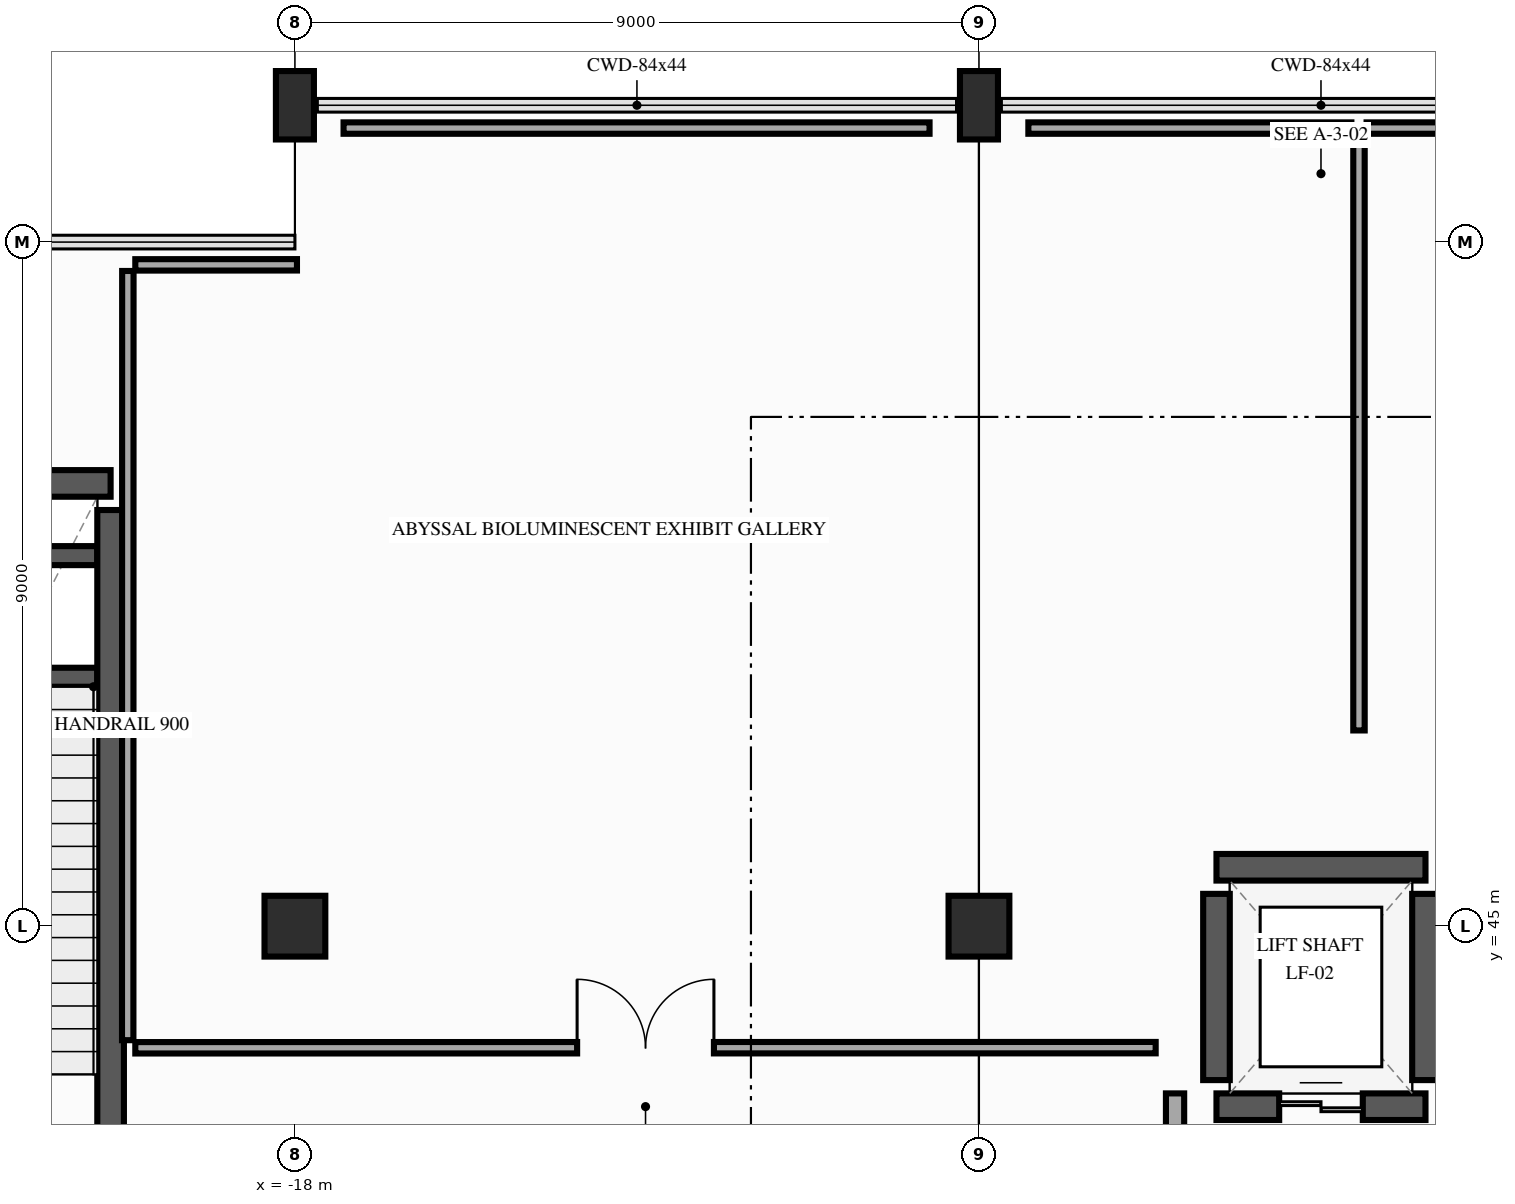
"""IFC4 building model, lengths in metres.
Left out: names, types, materials, properties, quantities, classifications, styles, units other than length and angle.
Written with IfcOpenShell. Run it as: python <this file> out.ifc"""

import sys

from ifc_helpers import new_model, si_unit, direction, frame, frame_2d, origin, origin_2d, place, context, subcontext, project, spatial, rectangle, extrude, element, fill, save


model = new_model("IFC4")
c1 = context("Model", 3, precision=1e-05, world=origin(), true_north=direction((0.0, 1.0)))
c2 = subcontext(c1, "Body", "Model", "MODEL_VIEW")
j1 = project(units=[si_unit("LENGTHUNIT", "METRE"), si_unit("PLANEANGLEUNIT", "RADIAN")], contexts=[c1])
p1 = place(None, origin())
s1 = spatial("IfcSite", under=j1, at=p1, CompositionType="ELEMENT")
p2 = place(p1, origin())
s2 = spatial("IfcBuilding", under=s1, at=p2, CompositionType="ELEMENT")
p3 = place(p2, frame((0.0, 0.0, 16.2)))
s3 = spatial("IfcBuildingStorey", under=s2, at=p3, CompositionType="ELEMENT", Elevation=16.2)
p4 = place(p3, frame((-18.0, 45.0, 0.0), z_axis=(0.0, 0.0, 1.0), x_axis=(1.0, 0.0, 0.0)))
e1 = element("IfcColumn", 1, at=p4, inside=s3, PredefinedType="COLUMN", context=c2, shape_type="SweptSolid", body=[
    extrude(rectangle(XDim=0.8, YDim=0.8, at=origin_2d()), origin(), (0.0, 0.0, 1.0), 5.4),
])
p5 = place(p3, frame((-18.0, 55.8, 0.0), z_axis=(0.0, 0.0, 1.0), x_axis=(1.0, 0.0, 0.0)))
e2 = element("IfcColumn", 2, at=p5, inside=s3, PredefinedType="PILASTER", context=c2, shape_type="SweptSolid", body=[
    extrude(rectangle(XDim=0.5, YDim=0.9, at=origin_2d()), origin(), (0.0, 0.0, 1.0), 5.4),
])
p6 = place(p3, frame((-9.0, 45.0, 0.0), z_axis=(0.0, 0.0, 1.0), x_axis=(1.0, 0.0, 0.0)))
e3 = element("IfcColumn", 3, at=p6, inside=s3, PredefinedType="COLUMN", context=c2, shape_type="SweptSolid", body=[
    extrude(rectangle(XDim=0.8, YDim=0.8, at=origin_2d()), origin(), (0.0, 0.0, 1.0), 5.4),
])
p7 = place(p3, frame((-9.0, 55.8, 0.0), z_axis=(0.0, 0.0, 1.0), x_axis=(1.0, 0.0, 0.0)))
e4 = element("IfcColumn", 4, at=p7, inside=s3, PredefinedType="PILASTER", context=c2, shape_type="SweptSolid", body=[
    extrude(rectangle(XDim=0.5, YDim=0.9, at=origin_2d()), origin(), (0.0, 0.0, 1.0), 5.4),
])
for number, where, z_axis, x_axis in (
    (5, (-24.4, 48.275, 0.0), (0.0, 0.0, 1.0), (1.0, 0.0, 0.0)),
    (6, (-24.4, 49.875, 0.0), (0.0, 0.0, 1.0), (1.0, 0.0, 0.0)),
):
    element("IfcWall", number, at=place(p3, frame(where, z_axis=z_axis, x_axis=x_axis)), inside=s3, PredefinedType="SHEAR", context=c2, shape_type="SweptSolid", body=[
        extrude(rectangle(XDim=3.8, YDim=0.25, at=frame_2d((1.9, 0.0))), origin(), (0.0, 0.0, 1.0), 2.5),
    ])
p8 = place(p3, frame((-24.575, 50.825, 0.0), z_axis=(0.0, 0.0, 1.0), x_axis=(1.0, 0.0, 0.0)))
e7 = element("IfcWall", 7, at=p8, inside=s3, PredefinedType="SHEAR", context=c2, shape_type="SweptSolid", body=[
    extrude(rectangle(XDim=4.15, YDim=0.35, at=frame_2d((2.075, 0.0))), origin(), (0.0, 0.0, 1.0), 5.15),
])
p9 = place(p3, frame((-20.425, 41.375, 0.0), z_axis=(0.0, 0.0, 1.0), x_axis=(0.0, 1.0, 0.0)))
e8 = element("IfcWall", 8, at=p9, inside=s3, PredefinedType="SHEAR", context=c2, shape_type="SweptSolid", body=[
    extrude(rectangle(XDim=9.1, YDim=0.35, at=frame_2d((4.55, 0.0))), origin(), (0.0, 0.0, 1.0), 5.15),
])
p10 = place(p3, frame((-5.875, 42.625, 0.0), z_axis=(0.0, 0.0, 1.0), x_axis=(1.0, 0.0, 0.0)))
e9 = element("IfcWall", 9, at=p10, inside=s3, PredefinedType="SHEAR", context=c2, shape_type="SweptSolid", body=[
    extrude(rectangle(XDim=2.75, YDim=0.35, at=frame_2d((1.375, 0.0))), origin(), (0.0, 0.0, 1.0), 5.15),
])
p11 = place(p10, frame((0.825, 0.0, 0.0)))
e10 = element("IfcOpeningElement", 10, at=p11, cuts=e9, PredefinedType="OPENING", context=c2, shape_type="SweptSolid", body=[
    extrude(rectangle(XDim=1.1, YDim=2.2, at=frame_2d((0.55, 1.1))), frame((0.0, 0.185, 0.0), z_axis=(0.0, -1.0, 0.0), x_axis=(1.0, 0.0, 0.0)), (0.0, 0.0, 1.0), 0.37),
])
p12 = place(p3, frame((-3.125, 45.775, 0.0), z_axis=(0.0, 0.0, 1.0), x_axis=(-1.0, 0.0, 0.0)))
e11 = element("IfcWall", 11, at=p12, inside=s3, PredefinedType="SHEAR", context=c2, shape_type="SweptSolid", body=[
    extrude(rectangle(XDim=2.75, YDim=0.35, at=frame_2d((1.375, 0.0))), origin(), (0.0, 0.0, 1.0), 5.15),
])
for number, where, z_axis, x_axis in (
    (12, (-5.875, 42.975, 0.0), (0.0, 0.0, 1.0), (0.0, 1.0, 0.0)),
    (13, (-3.125, 42.975, 0.0), (0.0, 0.0, 1.0), (0.0, 1.0, 0.0)),
):
    element("IfcWall", number, at=place(p3, frame(where, z_axis=z_axis, x_axis=x_axis)), inside=s3, PredefinedType="SHEAR", context=c2, shape_type="SweptSolid", body=[
        extrude(rectangle(XDim=2.45, YDim=0.35, at=frame_2d((1.225, 0.0))), origin(), (0.0, 0.0, 1.0), 5.15),
    ])
p13 = place(p3, frame((-6.42, 39.2, 0.0), z_axis=(0.0, 0.0, 1.0), x_axis=(0.0, 1.0, 0.0)))
e14 = element("IfcWall", 14, at=p13, inside=s3, PredefinedType="PARTITIONING", context=c2, shape_type="SweptSolid", body=[
    extrude(rectangle(XDim=3.6, YDim=0.24, at=frame_2d((1.8, 0.0))), origin(), (0.0, 0.0, 1.0), 4.635),
])
p14 = place(p3, frame((-20.198, 53.62, 0.0), z_axis=(0.0, 0.0, 1.0), x_axis=(-0.000192994303, -0.999999981377, 0.0)))
e15 = element("IfcWall", 15, at=p14, inside=s3, PredefinedType="PARTITIONING", context=c2, shape_type="SweptSolid", body=[
    extrude(rectangle(XDim=10.12, YDim=0.15, at=frame_2d((5.06, 0.0))), origin(), (0.0, 0.0, 1.0), 5.05),
])
p15 = place(p3, frame((-20.1, 43.4, 0.0), z_axis=(0.0, 0.0, 1.0), x_axis=(0.999999986606, 0.000163669095, 0.0)))
e16 = element("IfcWall", 16, at=p15, inside=s3, PredefinedType="PARTITIONING", context=c2, shape_type="SweptSolid", body=[
    extrude(rectangle(XDim=13.425, YDim=0.15, at=frame_2d((6.712, 0.0))), origin(), (0.0, 0.0, 1.0), 4.435),
])
p16 = place(p15, frame((5.813, 0.0, 0.0)))
e17 = element("IfcOpeningElement", 17, at=p16, cuts=e16, PredefinedType="OPENING", context=c2, shape_type="SweptSolid", body=[
    extrude(rectangle(XDim=1.8, YDim=2.3, at=frame_2d((0.9, 1.15))), frame((0.0, 0.085, 0.0), z_axis=(0.0, -1.0, 0.0), x_axis=(1.0, 0.0, 0.0)), (0.0, 0.0, 1.0), 0.17),
])
p17 = place(p3, frame((-4.0, 47.575, 0.0), z_axis=(0.0, 0.0, 1.0), x_axis=(0.0, 1.0, 0.0)))
e18 = element("IfcWall", 18, at=p17, inside=s3, PredefinedType="PARTITIONING", context=c2, shape_type="SweptSolid", body=[
    extrude(rectangle(XDim=7.825, YDim=0.15, at=frame_2d((3.913, 0.0))), origin(), (0.0, 0.0, 1.0), 4.385),
])
p18 = place(p3, frame((-4.1, 55.5, 0.0), z_axis=(0.0, 0.0, 1.0), x_axis=(-1.0, 0.0, 0.0)))
e19 = element("IfcWall", 19, at=p18, inside=s3, PredefinedType="PARTITIONING", context=c2, shape_type="SweptSolid", body=[
    extrude(rectangle(XDim=4.25, YDim=0.15, at=frame_2d((2.125, 0.0))), origin(), (0.0, 0.0, 1.0), 4.385),
])
p19 = place(p3, frame((-9.65, 55.5, 0.0), z_axis=(0.0, 0.0, 1.0), x_axis=(-1.0, 0.0, 0.0)))
e20 = element("IfcWall", 20, at=p19, inside=s3, PredefinedType="PARTITIONING", context=c2, shape_type="SweptSolid", body=[
    extrude(rectangle(XDim=7.71, YDim=0.15, at=frame_2d((3.855, 0.0))), origin(), (0.0, 0.0, 1.0), 4.385),
])
p20 = place(p3, frame((-17.973, 53.701, 0.0), z_axis=(0.0, 0.0, 1.0), x_axis=(-0.999999894621, -0.000459084079, 0.0)))
e21 = element("IfcWall", 21, at=p20, inside=s3, PredefinedType="PARTITIONING", context=c2, shape_type="SweptSolid", body=[
    extrude(rectangle(XDim=2.127, YDim=0.15, at=frame_2d((1.063, 0.0))), origin(), (0.0, 0.0, 1.0), 4.435),
])
p21 = place(p3, frame((-0.64, 55.5, 0.0), z_axis=(0.0, 0.0, 1.0), x_axis=(-1.0, 0.0, 0.0)))
e22 = element("IfcWall", 22, at=p21, inside=s3, PredefinedType="PARTITIONING", context=c2, shape_type="SweptSolid", body=[
    extrude(rectangle(XDim=3.26, YDim=0.15, at=frame_2d((1.63, 0.0))), origin(), (0.0, 0.0, 1.0), 4.385),
])
p22 = place(p11, origin())
e23 = element("IfcDoor", 23, at=p22, inside=s3, OperationType="DOUBLE_DOOR_SLIDING", PredefinedType="DOOR", context=c2, shape_type="SweptSolid", body=[
    extrude(rectangle(XDim=1.1, YDim=2.2, at=frame_2d((0.55, 1.1))), frame((0.0, 0.025, 0.0), z_axis=(0.0, -1.0, 0.0), x_axis=(1.0, 0.0, 0.0)), (0.0, 0.0, 1.0), 0.05),
])
fill(e10, e23)
p23 = place(p16, origin())
e24 = element("IfcDoor", 24, at=p23, inside=s3, OperationType="DOUBLE_DOOR_SINGLE_SWING", PredefinedType="DOOR", context=c2, shape_type="SweptSolid", body=[
    extrude(rectangle(XDim=1.8, YDim=2.3, at=frame_2d((0.9, 1.15))), frame((0.0, 0.025, 0.0), z_axis=(0.0, -1.0, 0.0), x_axis=(1.0, 0.0, 0.0)), (0.0, 0.0, 1.0), 0.05),
])
fill(e17, e24)
save(model, sys.argv[1])
